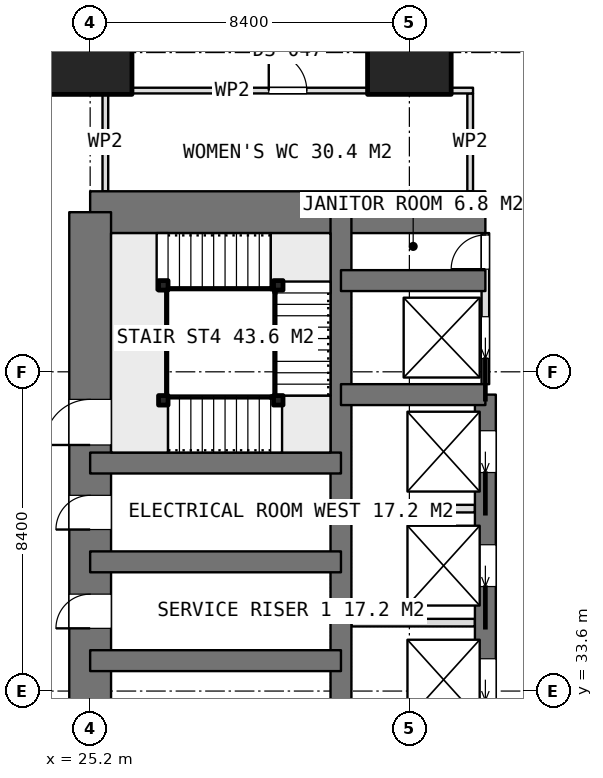
"""IFC4 building model, lengths in metres.
Left out: names, types, materials, properties, quantities, classifications, styles, units other than length and angle.
Written with IfcOpenShell. Run it as: python <this file> out.ifc"""

import sys

from ifc_helpers import new_model, si_unit, direction, frame, frame_2d, origin, origin_2d, place, context, subcontext, project, spatial, rectangle, extrude, element, fill, save


model = new_model("IFC4")
c1 = context("Model", 3, precision=1e-05, world=origin(), true_north=direction((0.0, 1.0)))
c2 = subcontext(c1, "Body", "Model", "MODEL_VIEW")
j1 = project(units=[si_unit("LENGTHUNIT", "METRE"), si_unit("PLANEANGLEUNIT", "RADIAN")], contexts=[c1])
p1 = place(None, origin())
s1 = spatial("IfcSite", under=j1, at=p1, CompositionType="ELEMENT")
p2 = place(p1, origin())
s2 = spatial("IfcBuilding", under=s1, at=p2, CompositionType="ELEMENT")
p3 = place(p2, frame((0.0, 0.0, 40.4)))
s3 = spatial("IfcBuildingStorey", under=s2, at=p3, CompositionType="ELEMENT", Elevation=40.4)
p4 = place(p3, frame((25.2, 46.2, 0.0), z_axis=(0.0, 0.0, 1.0), x_axis=(1.0, 0.0, 0.0)))
e1 = element("IfcWall", 1, at=p4, inside=s3, PredefinedType="SHEAR", context=c2, shape_type="SweptSolid", body=[
    extrude(rectangle(XDim=10.4, YDim=1.1, at=frame_2d((5.2, 0.0))), origin(), (0.0, 0.0, 1.0), 3.75),
])
p5 = place(p3, frame((25.2, 21.0, 0.0), z_axis=(0.0, 0.0, 1.0), x_axis=(0.0, 1.0, 0.0)))
e2 = element("IfcWall", 2, at=p5, inside=s3, PredefinedType="SHEAR", context=c2, shape_type="SweptSolid", body=[
    extrude(rectangle(XDim=25.2, YDim=1.1, at=frame_2d((12.6, 0.0))), origin(), (0.0, 0.0, 1.0), 3.75),
])
p6 = place(p5, frame((7.8, 0.0, 0.0)))
e3 = element("IfcOpeningElement", 3, at=p6, cuts=e2, PredefinedType="OPENING", context=c2, shape_type="SweptSolid", body=[
    extrude(rectangle(XDim=1.2, YDim=2.1, at=frame_2d((0.6, 1.05))), frame((0.0, 0.56, 0.0), z_axis=(0.0, -1.0, 0.0), x_axis=(1.0, 0.0, 0.0)), (0.0, 0.0, 1.0), 1.12),
])
p7 = place(p5, frame((14.25, 0.0, 0.0)))
e4 = element("IfcOpeningElement", 4, at=p7, cuts=e2, PredefinedType="OPENING", context=c2, shape_type="SweptSolid", body=[
    extrude(rectangle(XDim=0.9, YDim=2.1, at=frame_2d((0.45, 1.05))), frame((0.0, 0.56, 0.0), z_axis=(0.0, -1.0, 0.0), x_axis=(1.0, 0.0, 0.0)), (0.0, 0.0, 1.0), 1.12),
])
p8 = place(p5, frame((16.85, 0.0, 0.0)))
e5 = element("IfcOpeningElement", 5, at=p8, cuts=e2, PredefinedType="OPENING", context=c2, shape_type="SweptSolid", body=[
    extrude(rectangle(XDim=0.9, YDim=2.1, at=frame_2d((0.45, 1.05))), frame((0.0, 0.56, 0.0), z_axis=(0.0, -1.0, 0.0), x_axis=(1.0, 0.0, 0.0)), (0.0, 0.0, 1.0), 1.12),
])
p9 = place(p5, frame((19.075, 0.0, 0.0)))
e6 = element("IfcOpeningElement", 6, at=p9, cuts=e2, PredefinedType="OPENING", context=c2, shape_type="SweptSolid", body=[
    extrude(rectangle(XDim=1.2, YDim=2.1, at=frame_2d((0.6, 1.05))), frame((0.0, 0.56, 0.0), z_axis=(0.0, -1.0, 0.0), x_axis=(1.0, 0.0, 0.0)), (0.0, 0.0, 1.0), 1.12),
])
p10 = place(p3, frame((31.8, 21.0, 0.0), z_axis=(0.0, 0.0, 1.0), x_axis=(0.0, 1.0, 0.0)))
e7 = element("IfcWall", 7, at=p10, inside=s3, PredefinedType="SHEAR", context=c2, shape_type="SweptSolid", body=[
    extrude(rectangle(XDim=25.2, YDim=0.55, at=frame_2d((12.6, 0.0))), origin(), (0.0, 0.0, 1.0), 3.75),
])
p11 = place(p3, frame((35.6, 23.4, 0.0), z_axis=(0.0, 0.0, 1.0), x_axis=(0.0, 1.0, 0.0)))
e8 = element("IfcWall", 8, at=p11, inside=s3, PredefinedType="SHEAR", context=c2, shape_type="SweptSolid", body=[
    extrude(rectangle(XDim=18.0, YDim=0.55, at=frame_2d((9.0, 0.0))), origin(), (0.0, 0.0, 1.0), 3.75),
])
p12 = place(p11, frame((0.95, 0.0, 0.0)))
e9 = element("IfcOpeningElement", 9, at=p12, cuts=e8, PredefinedType="OPENING", context=c2, shape_type="SweptSolid", body=[
    extrude(rectangle(XDim=1.1, YDim=2.1, at=frame_2d((0.55, 1.05))), frame((0.0, 0.285, 0.0), z_axis=(0.0, -1.0, 0.0), x_axis=(1.0, 0.0, 0.0)), (0.0, 0.0, 1.0), 0.57),
])
p13 = place(p11, frame((3.95, 0.0, 0.0)))
e10 = element("IfcOpeningElement", 10, at=p13, cuts=e8, PredefinedType="OPENING", context=c2, shape_type="SweptSolid", body=[
    extrude(rectangle(XDim=1.1, YDim=2.1, at=frame_2d((0.55, 1.05))), frame((0.0, 0.285, 0.0), z_axis=(0.0, -1.0, 0.0), x_axis=(1.0, 0.0, 0.0)), (0.0, 0.0, 1.0), 0.57),
])
p14 = place(p11, frame((6.95, 0.0, 0.0)))
e11 = element("IfcOpeningElement", 11, at=p14, cuts=e8, PredefinedType="OPENING", context=c2, shape_type="SweptSolid", body=[
    extrude(rectangle(XDim=1.1, YDim=2.1, at=frame_2d((0.55, 1.05))), frame((0.0, 0.285, 0.0), z_axis=(0.0, -1.0, 0.0), x_axis=(1.0, 0.0, 0.0)), (0.0, 0.0, 1.0), 0.57),
])
p15 = place(p11, frame((9.95, 0.0, 0.0)))
e12 = element("IfcOpeningElement", 12, at=p15, cuts=e8, PredefinedType="OPENING", context=c2, shape_type="SweptSolid", body=[
    extrude(rectangle(XDim=1.1, YDim=2.1, at=frame_2d((0.55, 1.05))), frame((0.0, 0.285, 0.0), z_axis=(0.0, -1.0, 0.0), x_axis=(1.0, 0.0, 0.0)), (0.0, 0.0, 1.0), 0.57),
])
p16 = place(p11, frame((12.95, 0.0, 0.0)))
e13 = element("IfcOpeningElement", 13, at=p16, cuts=e8, PredefinedType="OPENING", context=c2, shape_type="SweptSolid", body=[
    extrude(rectangle(XDim=1.1, YDim=2.1, at=frame_2d((0.55, 1.05))), frame((0.0, 0.285, 0.0), z_axis=(0.0, -1.0, 0.0), x_axis=(1.0, 0.0, 0.0)), (0.0, 0.0, 1.0), 0.57),
])
p17 = place(p11, frame((15.95, 0.0, 0.0)))
e14 = element("IfcOpeningElement", 14, at=p17, cuts=e8, PredefinedType="OPENING", context=c2, shape_type="SweptSolid", body=[
    extrude(rectangle(XDim=1.1, YDim=2.1, at=frame_2d((0.55, 1.05))), frame((0.0, 0.285, 0.0), z_axis=(0.0, -1.0, 0.0), x_axis=(1.0, 0.0, 0.0)), (0.0, 0.0, 1.0), 0.57),
])
for number, where, z_axis, x_axis in (
    (15, (31.8, 41.4, 0.0), (0.0, 0.0, 1.0), (1.0, 0.0, 0.0)),
    (16, (31.8, 44.4, 0.0), (0.0, 0.0, 1.0), (1.0, 0.0, 0.0)),
):
    element("IfcWall", number, at=place(p3, frame(where, z_axis=z_axis, x_axis=x_axis)), inside=s3, PredefinedType="SHEAR", context=c2, shape_type="SweptSolid", body=[
        extrude(rectangle(XDim=3.8, YDim=0.55, at=frame_2d((1.9, 0.0))), origin(), (0.0, 0.0, 1.0), 3.75),
    ])
for number, where, z_axis, x_axis in (
    (17, (25.2, 34.4, 0.0), (0.0, 0.0, 1.0), (1.0, 0.0, 0.0)),
    (18, (25.2, 37.0, 0.0), (0.0, 0.0, 1.0), (1.0, 0.0, 0.0)),
    (19, (25.2, 39.6, 0.0), (0.0, 0.0, 1.0), (1.0, 0.0, 0.0)),
):
    element("IfcWall", number, at=place(p3, frame(where, z_axis=z_axis, x_axis=x_axis)), inside=s3, PredefinedType="SHEAR", context=c2, shape_type="SweptSolid", body=[
        extrude(rectangle(XDim=6.6, YDim=0.55, at=frame_2d((3.3, 0.0))), origin(), (0.0, 0.0, 1.0), 3.75),
    ])
for number, where, z_axis, x_axis in (
    (20, (25.2, 50.4, 0.0), (0.0, 0.0, 1.0), (1.0, 0.0, 0.0)),
    (21, (33.6, 50.4, 0.0), (0.0, 0.0, 1.0), (1.0, 0.0, 0.0)),
):
    element("IfcColumn", number, at=place(p3, frame(where, z_axis=z_axis, x_axis=x_axis)), inside=s3, PredefinedType="COLUMN", context=c2, shape_type="SweptSolid", body=[
        extrude(rectangle(XDim=2.2, YDim=2.2, at=origin_2d()), origin(), (0.0, 0.0, 1.0), 3.75),
    ])
for number, where, z_axis, x_axis in (
    (22, (32.075, 35.4, 0.0), (0.0, 0.0, 1.0), (1.0, 0.0, 0.0)),
    (23, (32.075, 38.4, 0.0), (0.0, 0.0, 1.0), (1.0, 0.0, 0.0)),
):
    element("IfcWall", number, at=place(p3, frame(where, z_axis=z_axis, x_axis=x_axis)), inside=s3, PredefinedType="PARTITIONING", context=c2, shape_type="SweptSolid", body=[
        extrude(rectangle(XDim=3.25, YDim=0.2, at=frame_2d((1.625, 0.0))), origin(), (0.0, 0.0, 1.0), 3.5),
    ])
p18 = place(p3, frame((35.6, 41.675, 0.0), z_axis=(0.0, 0.0, 1.0), x_axis=(0.0, 1.0, 0.0)))
e24 = element("IfcWall", 24, at=p18, inside=s3, PredefinedType="PARTITIONING", context=c2, shape_type="SweptSolid", body=[
    extrude(rectangle(XDim=3.975, YDim=0.2, at=frame_2d((1.987, 0.0))), origin(), (0.0, 0.0, 1.0), 3.5),
])
p19 = place(p18, frame((3.025, 0.0, 0.0)))
e25 = element("IfcOpeningElement", 25, at=p19, cuts=e24, PredefinedType="OPENING", context=c2, shape_type="SweptSolid", body=[
    extrude(rectangle(XDim=0.9, YDim=2.1, at=frame_2d((0.45, 1.05))), frame((0.0, 0.11, 0.0), z_axis=(0.0, -1.0, 0.0), x_axis=(1.0, 0.0, 0.0)), (0.0, 0.0, 1.0), 0.22),
])
p20 = place(p18, frame((0.675, 0.0, 0.0)))
e26 = element("IfcOpeningElement", 26, at=p20, cuts=e24, PredefinedType="OPENING", context=c2, shape_type="SweptSolid", body=[
    extrude(rectangle(XDim=1.1, YDim=2.1, at=frame_2d((0.55, 1.05))), frame((0.0, 0.11, 0.0), z_axis=(0.0, -1.0, 0.0), x_axis=(1.0, 0.0, 0.0)), (0.0, 0.0, 1.0), 0.22),
])
p21 = place(p3, frame((25.525, 49.4, 0.0), z_axis=(0.0, 0.0, 1.0), x_axis=(1.0, 0.0, 0.0)))
e27 = element("IfcWall", 27, at=p21, inside=s3, PredefinedType="PARTITIONING", context=c2, shape_type="SweptSolid", body=[
    extrude(rectangle(XDim=9.75, YDim=0.15, at=frame_2d((4.875, 0.0))), origin(), (0.0, 0.0, 1.0), 3.5),
])
p22 = place(p21, frame((4.375, 0.0, 0.0)))
e28 = element("IfcOpeningElement", 28, at=p22, cuts=e27, PredefinedType="OPENING", context=c2, shape_type="SweptSolid", body=[
    extrude(rectangle(XDim=1.0, YDim=2.1, at=frame_2d((0.5, 1.05))), frame((0.0, 0.085, 0.0), z_axis=(0.0, -1.0, 0.0), x_axis=(1.0, 0.0, 0.0)), (0.0, 0.0, 1.0), 0.17),
])
for number, where, z_axis, x_axis in (
    (29, (25.6, 46.75, 0.0), (0.0, 0.0, 1.0), (0.0, 1.0, 0.0)),
    (30, (35.2, 46.75, 0.0), (0.0, 0.0, 1.0), (0.0, 1.0, 0.0)),
):
    element("IfcWall", number, at=place(p3, frame(where, z_axis=z_axis, x_axis=x_axis)), inside=s3, PredefinedType="PARTITIONING", context=c2, shape_type="SweptSolid", body=[
        extrude(rectangle(XDim=2.575, YDim=0.15, at=frame_2d((1.288, 0.0))), origin(), (0.0, 0.0, 1.0), 3.5),
    ])
for number, where, z_axis, x_axis in (
    (31, (27.125, 41.25, 0.0), (0.0, 0.0, 1.0), (1.0, 0.0, 0.0)),
    (32, (30.15, 41.25, 0.0), (0.0, 0.0, 1.0), (1.0, 0.0, 0.0)),
    (33, (30.15, 44.275, 0.0), (0.0, 0.0, 1.0), (1.0, 0.0, 0.0)),
    (34, (27.125, 44.275, 0.0), (0.0, 0.0, 1.0), (1.0, 0.0, 0.0)),
):
    element("IfcColumn", number, at=place(p3, frame(where, z_axis=z_axis, x_axis=x_axis)), inside=s3, PredefinedType="COLUMN", context=c2, shape_type="SweptSolid", body=[
        extrude(rectangle(XDim=0.25, YDim=0.25, at=origin_2d()), origin(), (0.0, 0.0, 1.0), 3.75),
    ])
p23 = place(p7, origin())
e35 = element("IfcDoor", 35, at=p23, inside=s3, OperationType="SINGLE_SWING_LEFT", PredefinedType="DOOR", context=c2, shape_type="SweptSolid", body=[
    extrude(rectangle(XDim=0.9, YDim=2.1, at=frame_2d((0.45, 1.05))), frame((0.0, 0.025, 0.0), z_axis=(0.0, -1.0, 0.0), x_axis=(1.0, 0.0, 0.0)), (0.0, 0.0, 1.0), 0.05),
])
fill(e4, e35)
p24 = place(p8, origin())
e36 = element("IfcDoor", 36, at=p24, inside=s3, OperationType="SINGLE_SWING_LEFT", PredefinedType="DOOR", context=c2, shape_type="SweptSolid", body=[
    extrude(rectangle(XDim=0.9, YDim=2.1, at=frame_2d((0.45, 1.05))), frame((0.0, 0.025, 0.0), z_axis=(0.0, -1.0, 0.0), x_axis=(1.0, 0.0, 0.0)), (0.0, 0.0, 1.0), 0.05),
])
fill(e5, e36)
p25 = place(p19, origin())
e37 = element("IfcDoor", 37, at=p25, inside=s3, OperationType="SINGLE_SWING_LEFT", PredefinedType="DOOR", context=c2, shape_type="SweptSolid", body=[
    extrude(rectangle(XDim=0.9, YDim=2.1, at=frame_2d((0.45, 1.05))), frame((0.0, 0.025, 0.0), z_axis=(0.0, -1.0, 0.0), x_axis=(1.0, 0.0, 0.0)), (0.0, 0.0, 1.0), 0.05),
])
fill(e25, e37)
p26 = place(p15, origin())
e38 = element("IfcDoor", 38, at=p26, inside=s3, OperationType="SLIDING_TO_LEFT", PredefinedType="USERDEFINED", context=c2, shape_type="SweptSolid", body=[
    extrude(rectangle(XDim=1.1, YDim=2.1, at=frame_2d((0.55, 1.05))), frame((0.0, 0.025, 0.0), z_axis=(0.0, -1.0, 0.0), x_axis=(1.0, 0.0, 0.0)), (0.0, 0.0, 1.0), 0.05),
])
fill(e12, e38)
p27 = place(p16, origin())
e39 = element("IfcDoor", 39, at=p27, inside=s3, OperationType="SLIDING_TO_LEFT", PredefinedType="USERDEFINED", context=c2, shape_type="SweptSolid", body=[
    extrude(rectangle(XDim=1.1, YDim=2.1, at=frame_2d((0.55, 1.05))), frame((0.0, 0.025, 0.0), z_axis=(0.0, -1.0, 0.0), x_axis=(1.0, 0.0, 0.0)), (0.0, 0.0, 1.0), 0.05),
])
fill(e13, e39)
p28 = place(p17, origin())
e40 = element("IfcDoor", 40, at=p28, inside=s3, OperationType="SLIDING_TO_LEFT", PredefinedType="USERDEFINED", context=c2, shape_type="SweptSolid", body=[
    extrude(rectangle(XDim=1.1, YDim=2.1, at=frame_2d((0.55, 1.05))), frame((0.0, 0.025, 0.0), z_axis=(0.0, -1.0, 0.0), x_axis=(1.0, 0.0, 0.0)), (0.0, 0.0, 1.0), 0.05),
])
fill(e14, e40)
p29 = place(p20, origin())
e41 = element("IfcDoor", 41, at=p29, inside=s3, OperationType="SLIDING_TO_LEFT", PredefinedType="USERDEFINED", context=c2, shape_type="SweptSolid", body=[
    extrude(rectangle(XDim=1.1, YDim=2.1, at=frame_2d((0.55, 1.05))), frame((0.0, 0.025, 0.0), z_axis=(0.0, -1.0, 0.0), x_axis=(1.0, 0.0, 0.0)), (0.0, 0.0, 1.0), 0.05),
])
fill(e26, e41)
p30 = place(p22, origin())
e42 = element("IfcDoor", 42, at=p30, inside=s3, OperationType="SINGLE_SWING_LEFT", PredefinedType="DOOR", context=c2, shape_type="SweptSolid", body=[
    extrude(rectangle(XDim=1.0, YDim=2.1, at=frame_2d((0.5, 1.05))), frame((0.0, 0.025, 0.0), z_axis=(0.0, -1.0, 0.0), x_axis=(1.0, 0.0, 0.0)), (0.0, 0.0, 1.0), 0.05),
])
fill(e28, e42)
p31 = place(p9, origin())
e43 = element("IfcDoor", 43, at=p31, inside=s3, OperationType="SINGLE_SWING_RIGHT", PredefinedType="DOOR", context=c2, shape_type="SweptSolid", body=[
    extrude(rectangle(XDim=1.2, YDim=2.1, at=frame_2d((0.6, 1.05))), frame((0.0, 0.025, 0.0), z_axis=(0.0, -1.0, 0.0), x_axis=(1.0, 0.0, 0.0)), (0.0, 0.0, 1.0), 0.05),
])
fill(e6, e43)
save(model, sys.argv[1])
